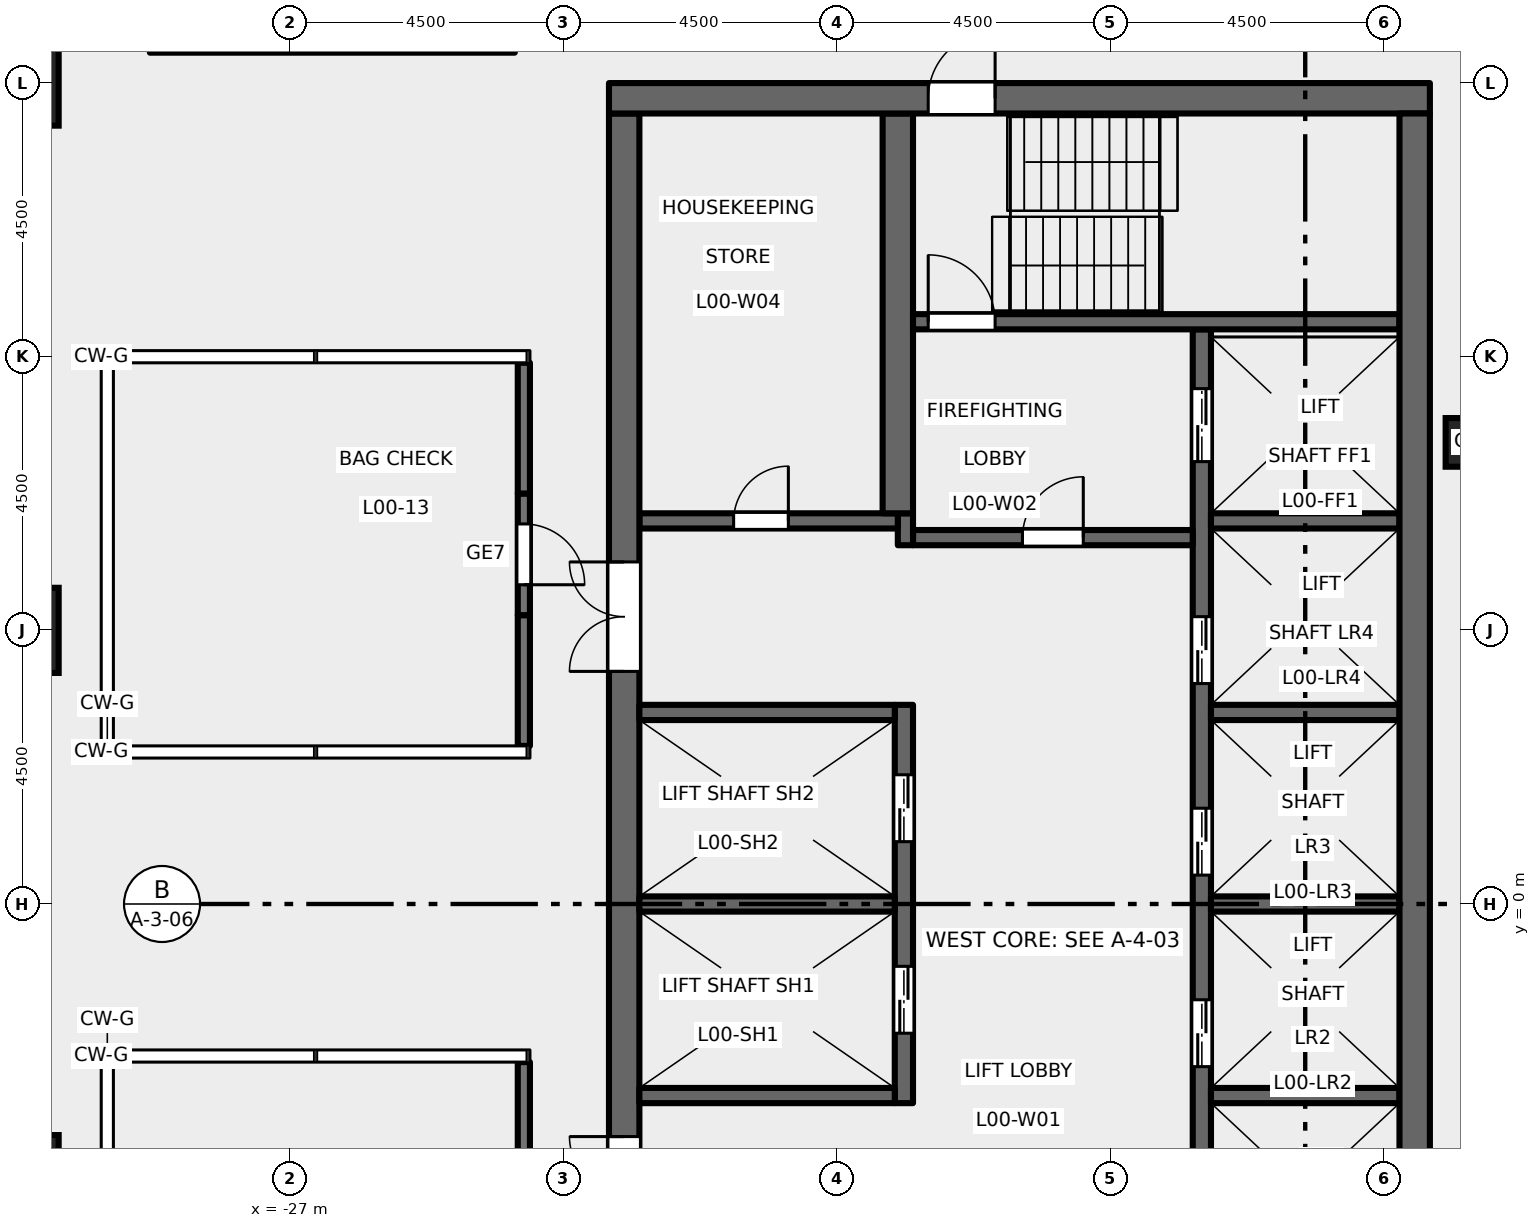
"""IFC4 building model, lengths in metres.
Left out: names, types, materials, properties, quantities, classifications, styles, units other than length and angle.
Written with IfcOpenShell. Run it as: python <this file> out.ifc"""

import sys

from ifc_helpers import new_model, si_unit, direction, frame, frame_2d, origin, origin_2d, place, context, subcontext, project, spatial, rectangle, hollow_rectangle, extrude, element, fill, save


model = new_model("IFC4")
c1 = context("Model", 3, precision=1e-05, world=origin(), true_north=direction((0.0, 1.0)))
c2 = subcontext(c1, "Body", "Model", "MODEL_VIEW")
j1 = project(units=[si_unit("LENGTHUNIT", "METRE"), si_unit("PLANEANGLEUNIT", "RADIAN")], contexts=[c1])
p1 = place(None, origin())
s1 = spatial("IfcSite", under=j1, at=p1, CompositionType="ELEMENT")
p2 = place(p1, origin())
s2 = spatial("IfcBuilding", under=s1, at=p2, CompositionType="ELEMENT")
p3 = place(p2, origin())
s3 = spatial("IfcBuildingStorey", under=s2, at=p3, CompositionType="ELEMENT", Elevation=0.0)
for number, where, z_axis, x_axis in (
    (1, (-31.5, 13.5, 0.0), (0.0, 0.0, 1.0), (1.0, 0.0, 0.0)),
    (2, (-31.5, 4.5, 0.0), (0.0, 0.0, 1.0), (1.0, 0.0, 0.0)),
    (3, (-31.5, -4.5, 0.0), (0.0, 0.0, 1.0), (1.0, 0.0, 0.0)),
):
    element("IfcColumn", number, at=place(p3, frame(where, z_axis=z_axis, x_axis=x_axis)), inside=s3, PredefinedType="COLUMN", context=c2, shape_type="SweptSolid", body=[
        extrude(hollow_rectangle(XDim=1.4, YDim=1.4, WallThickness=0.07, at=origin_2d()), origin(), (0.0, 0.0, 1.0), 7.2),
    ])
p4 = place(p3, frame((-7.591, 7.591, 0.0), z_axis=(0.0, 0.0, 1.0), x_axis=(1.0, 0.0, 0.0)))
e4 = element("IfcColumn", 4, at=p4, inside=s3, PredefinedType="COLUMN", context=c2, shape_type="SweptSolid", body=[
    extrude(hollow_rectangle(XDim=0.8, YDim=0.8, WallThickness=0.05, at=origin_2d()), origin(), (0.0, 0.0, 1.0), 7.2),
])
p5 = place(p3, frame((-12.0, -9.45, 0.0), z_axis=(0.0, 0.0, 1.0), x_axis=(0.0, 1.0, 0.0)))
e5 = element("IfcWall", 5, at=p5, inside=s3, PredefinedType="SHEAR", context=c2, shape_type="SweptSolid", body=[
    extrude(rectangle(XDim=18.9, YDim=0.3, at=frame_2d((9.45, 0.0))), origin(), (0.0, 0.0, 1.0), 7.0),
])
p6 = place(p5, frame((3.625, 0.0, 0.0)))
e6 = element("IfcOpeningElement", 6, at=p6, cuts=e5, PredefinedType="OPENING", context=c2, shape_type="SweptSolid", body=[
    extrude(rectangle(XDim=1.1, YDim=2.1, at=frame_2d((0.55, 1.05))), frame((0.0, 0.16, 0.0), z_axis=(0.0, -1.0, 0.0), x_axis=(1.0, 0.0, 0.0)), (0.0, 0.0, 1.0), 0.32),
])
p7 = place(p5, frame((6.775, 0.0, 0.0)))
e7 = element("IfcOpeningElement", 7, at=p7, cuts=e5, PredefinedType="OPENING", context=c2, shape_type="SweptSolid", body=[
    extrude(rectangle(XDim=1.1, YDim=2.1, at=frame_2d((0.55, 1.05))), frame((0.0, 0.16, 0.0), z_axis=(0.0, -1.0, 0.0), x_axis=(1.0, 0.0, 0.0)), (0.0, 0.0, 1.0), 0.32),
])
p8 = place(p5, frame((9.925, 0.0, 0.0)))
e8 = element("IfcOpeningElement", 8, at=p8, cuts=e5, PredefinedType="OPENING", context=c2, shape_type="SweptSolid", body=[
    extrude(rectangle(XDim=1.1, YDim=2.1, at=frame_2d((0.55, 1.05))), frame((0.0, 0.16, 0.0), z_axis=(0.0, -1.0, 0.0), x_axis=(1.0, 0.0, 0.0)), (0.0, 0.0, 1.0), 0.32),
])
p9 = place(p5, frame((13.075, 0.0, 0.0)))
e9 = element("IfcOpeningElement", 9, at=p9, cuts=e5, PredefinedType="OPENING", context=c2, shape_type="SweptSolid", body=[
    extrude(rectangle(XDim=1.1, YDim=2.1, at=frame_2d((0.55, 1.05))), frame((0.0, 0.16, 0.0), z_axis=(0.0, -1.0, 0.0), x_axis=(1.0, 0.0, 0.0)), (0.0, 0.0, 1.0), 0.32),
])
p10 = place(p5, frame((16.725, 0.0, 0.0)))
e10 = element("IfcOpeningElement", 10, at=p10, cuts=e5, PredefinedType="OPENING", context=c2, shape_type="SweptSolid", body=[
    extrude(rectangle(XDim=1.2, YDim=2.1, at=frame_2d((0.6, 1.05))), frame((0.0, 0.16, 0.0), z_axis=(0.0, -1.0, 0.0), x_axis=(1.0, 0.0, 0.0)), (0.0, 0.0, 1.0), 0.32),
])
p11 = place(p5, frame((0.975, 0.0, 0.0)))
e11 = element("IfcOpeningElement", 11, at=p11, cuts=e5, PredefinedType="OPENING", context=c2, shape_type="SweptSolid", body=[
    extrude(rectangle(XDim=1.2, YDim=2.1, at=frame_2d((0.6, 1.05))), frame((0.0, 0.16, 0.0), z_axis=(0.0, -1.0, 0.0), x_axis=(1.0, 0.0, 0.0)), (0.0, 0.0, 1.0), 0.32),
])
p12 = place(p3, frame((-12.15, 6.025, 0.0), z_axis=(0.0, 0.0, 1.0), x_axis=(-1.0, 0.0, 0.0)))
e12 = element("IfcWall", 12, at=p12, inside=s3, PredefinedType="SHEAR", context=c2, shape_type="SweptSolid", body=[
    extrude(rectangle(XDim=4.6, YDim=0.25, at=frame_2d((2.3, 0.0))), origin(), (0.0, 0.0, 1.0), 7.0),
])
p13 = place(p12, frame((1.8, 0.0, 0.0)))
e13 = element("IfcOpeningElement", 13, at=p13, cuts=e12, PredefinedType="OPENING", context=c2, shape_type="SweptSolid", body=[
    extrude(rectangle(XDim=1.0, YDim=2.1, at=frame_2d((0.5, 1.05))), frame((0.0, 0.135, 0.0), z_axis=(0.0, -1.0, 0.0), x_axis=(1.0, 0.0, 0.0)), (0.0, 0.0, 1.0), 0.27),
])
p14 = place(p3, frame((-16.875, 5.9, 0.0), z_axis=(0.0, 0.0, 1.0), x_axis=(0.0, 1.0, 0.0)))
e14 = element("IfcWall", 14, at=p14, inside=s3, PredefinedType="SHEAR", context=c2, shape_type="SweptSolid", body=[
    extrude(rectangle(XDim=0.525, YDim=0.25, at=frame_2d((0.263, 0.0))), origin(), (0.0, 0.0, 1.0), 7.0),
])
p15 = place(p3, frame((-17.0, 6.3, 0.0), z_axis=(0.0, 0.0, 1.0), x_axis=(-1.0, 0.0, 0.0)))
e15 = element("IfcWall", 15, at=p15, inside=s3, PredefinedType="SHEAR", context=c2, shape_type="SweptSolid", body=[
    extrude(rectangle(XDim=4.25, YDim=0.25, at=frame_2d((2.125, 0.0))), origin(), (0.0, 0.0, 1.0), 7.0),
])
p16 = place(p15, frame((1.8, 0.0, 0.0)))
e16 = element("IfcOpeningElement", 16, at=p16, cuts=e15, PredefinedType="OPENING", context=c2, shape_type="SweptSolid", body=[
    extrude(rectangle(XDim=0.9, YDim=2.1, at=frame_2d((0.45, 1.05))), frame((0.0, 0.135, 0.0), z_axis=(0.0, -1.0, 0.0), x_axis=(1.0, 0.0, 0.0)), (0.0, 0.0, 1.0), 0.27),
])
p17 = place(p3, frame((-21.5, -13.0, 0.0), z_axis=(0.0, 0.0, 1.0), x_axis=(0.0, 1.0, 0.0)))
e17 = element("IfcWall", 17, at=p17, inside=s3, PredefinedType="SHEAR", context=c2, shape_type="SweptSolid", body=[
    extrude(rectangle(XDim=26.0, YDim=0.5, at=frame_2d((13.0, 0.0))), origin(), (0.0, 0.0, 1.0), 7.0),
])
p18 = place(p17, frame((16.825, 0.0, 0.0)))
e18 = element("IfcOpeningElement", 18, at=p18, cuts=e17, PredefinedType="OPENING", context=c2, shape_type="SweptSolid", body=[
    extrude(rectangle(XDim=1.8, YDim=2.1, at=frame_2d((0.9, 1.05))), frame((0.0, 0.26, 0.0), z_axis=(0.0, -1.0, 0.0), x_axis=(1.0, 0.0, 0.0)), (0.0, 0.0, 1.0), 0.52),
])
p19 = place(p17, frame((7.375, 0.0, 0.0)))
e19 = element("IfcOpeningElement", 19, at=p19, cuts=e17, PredefinedType="OPENING", context=c2, shape_type="SweptSolid", body=[
    extrude(rectangle(XDim=1.8, YDim=2.1, at=frame_2d((0.9, 1.05))), frame((0.0, 0.26, 0.0), z_axis=(0.0, -1.0, 0.0), x_axis=(1.0, 0.0, 0.0)), (0.0, 0.0, 1.0), 0.52),
])
p20 = place(p17, frame((2.6, 0.0, 0.0)))
e20 = element("IfcOpeningElement", 20, at=p20, cuts=e17, PredefinedType="OPENING", context=c2, shape_type="SweptSolid", body=[
    extrude(rectangle(XDim=1.0, YDim=2.1, at=frame_2d((0.5, 1.05))), frame((0.0, 0.26, 0.0), z_axis=(0.0, -1.0, 0.0), x_axis=(1.0, 0.0, 0.0)), (0.0, 0.0, 1.0), 0.52),
])
p21 = place(p3, frame((-16.9, -3.275, 0.0), z_axis=(0.0, 0.0, 1.0), x_axis=(0.0, 1.0, 0.0)))
e21 = element("IfcWall", 21, at=p21, inside=s3, PredefinedType="SHEAR", context=c2, shape_type="SweptSolid", body=[
    extrude(rectangle(XDim=6.55, YDim=0.3, at=frame_2d((3.275, 0.0))), origin(), (0.0, 0.0, 1.0), 7.0),
])
p22 = place(p21, frame((1.15, 0.0, 0.0)))
e22 = element("IfcOpeningElement", 22, at=p22, cuts=e21, PredefinedType="OPENING", context=c2, shape_type="SweptSolid", body=[
    extrude(rectangle(XDim=1.1, YDim=2.1, at=frame_2d((0.55, 1.05))), frame((0.0, 0.16, 0.0), z_axis=(0.0, -1.0, 0.0), x_axis=(1.0, 0.0, 0.0)), (0.0, 0.0, 1.0), 0.32),
])
p23 = place(p21, frame((4.3, 0.0, 0.0)))
e23 = element("IfcOpeningElement", 23, at=p23, cuts=e21, PredefinedType="OPENING", context=c2, shape_type="SweptSolid", body=[
    extrude(rectangle(XDim=1.1, YDim=2.1, at=frame_2d((0.55, 1.05))), frame((0.0, 0.16, 0.0), z_axis=(0.0, -1.0, 0.0), x_axis=(1.0, 0.0, 0.0)), (0.0, 0.0, 1.0), 0.32),
])
for number, where, z_axis, x_axis in (
    (24, (-17.05, 0.0, 0.0), (0.0, 0.0, 1.0), (-1.0, 0.0, 0.0)),
    (25, (-17.05, 3.15, 0.0), (0.0, 0.0, 1.0), (-1.0, 0.0, 0.0)),
    (26, (-17.05, -3.15, 0.0), (0.0, 0.0, 1.0), (-1.0, 0.0, 0.0)),
):
    element("IfcWall", number, at=place(p3, frame(where, z_axis=z_axis, x_axis=x_axis)), inside=s3, PredefinedType="SHEAR", context=c2, shape_type="SweptSolid", body=[
        extrude(rectangle(XDim=4.2, YDim=0.25, at=frame_2d((2.1, 0.0))), origin(), (0.0, 0.0, 1.0), 7.0),
    ])
p24 = place(p3, frame((-17.0, 6.425, 0.0), z_axis=(0.0, 0.0, 1.0), x_axis=(0.0, 1.0, 0.0)))
e27 = element("IfcWall", 27, at=p24, inside=s3, PredefinedType="SHEAR", context=c2, shape_type="SweptSolid", body=[
    extrude(rectangle(XDim=6.575, YDim=0.5, at=frame_2d((3.288, 0.0))), origin(), (0.0, 0.0, 1.0), 7.0),
])
for number, where, z_axis, x_axis in (
    (28, (-8.75, 0.0, 0.0), (0.0, 0.0, 1.0), (-1.0, 0.0, 0.0)),
    (29, (-8.75, 3.15, 0.0), (0.0, 0.0, 1.0), (-1.0, 0.0, 0.0)),
    (30, (-8.75, 6.3, 0.0), (0.0, 0.0, 1.0), (-1.0, 0.0, 0.0)),
    (31, (-8.75, -3.15, 0.0), (0.0, 0.0, 1.0), (-1.0, 0.0, 0.0)),
):
    element("IfcWall", number, at=place(p3, frame(where, z_axis=z_axis, x_axis=x_axis)), inside=s3, PredefinedType="SHEAR", context=c2, shape_type="SweptSolid", body=[
        extrude(rectangle(XDim=3.1, YDim=0.25, at=frame_2d((1.55, 0.0))), origin(), (0.0, 0.0, 1.0), 7.0),
    ])
p25 = place(p3, frame((-8.75, 9.575, 0.0), z_axis=(0.0, 0.0, 1.0), x_axis=(-1.0, 0.0, 0.0)))
e32 = element("IfcWall", 32, at=p25, inside=s3, PredefinedType="SHEAR", context=c2, shape_type="SweptSolid", body=[
    extrude(rectangle(XDim=8.0, YDim=0.25, at=frame_2d((4.0, 0.0))), origin(), (0.0, 0.0, 1.0), 7.0),
])
p26 = place(p25, frame((6.65, 0.0, 0.0)))
e33 = element("IfcOpeningElement", 33, at=p26, cuts=e32, PredefinedType="OPENING", context=c2, shape_type="SweptSolid", body=[
    extrude(rectangle(XDim=1.1, YDim=2.1, at=frame_2d((0.55, 1.05))), frame((0.0, 0.135, 0.0), z_axis=(0.0, -1.0, 0.0), x_axis=(1.0, 0.0, 0.0)), (0.0, 0.0, 1.0), 0.27),
])
p27 = place(p3, frame((-8.25, 13.25, 0.0), z_axis=(0.0, 0.0, 1.0), x_axis=(-1.0, 0.0, 0.0)))
e34 = element("IfcWall", 34, at=p27, inside=s3, PredefinedType="SHEAR", context=c2, shape_type="SweptSolid", body=[
    extrude(rectangle(XDim=13.5, YDim=0.5, at=frame_2d((6.75, 0.0))), origin(), (0.0, 0.0, 1.0), 7.0),
])
p28 = place(p27, frame((7.15, 0.0, 0.0)))
e35 = element("IfcOpeningElement", 35, at=p28, cuts=e34, PredefinedType="OPENING", context=c2, shape_type="SweptSolid", body=[
    extrude(rectangle(XDim=1.1, YDim=2.1, at=frame_2d((0.55, 1.05))), frame((0.0, 0.26, 0.0), z_axis=(0.0, -1.0, 0.0), x_axis=(1.0, 0.0, 0.0)), (0.0, 0.0, 1.0), 0.52),
])
p29 = place(p3, frame((-8.5, -13.0, 0.0), z_axis=(0.0, 0.0, 1.0), x_axis=(0.0, 1.0, 0.0)))
e36 = element("IfcWall", 36, at=p29, inside=s3, PredefinedType="SHEAR", context=c2, shape_type="SweptSolid", body=[
    extrude(rectangle(XDim=26.0, YDim=0.5, at=frame_2d((13.0, 0.0))), origin(), (0.0, 0.0, 1.0), 7.0),
])
p30 = place(p3, frame((-23.15, -4.35, 0.0), z_axis=(0.0, 0.0, 1.0), x_axis=(0.0, 1.0, 0.0)))
e37 = element("IfcWall", 37, at=p30, inside=s3, PredefinedType="SOLIDWALL", context=c2, shape_type="SweptSolid", body=[
    extrude(rectangle(XDim=1.75, YDim=0.2, at=frame_2d((0.875, 0.0))), origin(), (0.0, 0.0, 1.0), 4.3),
])
p31 = place(p3, frame((-23.15, 2.6, 0.0), z_axis=(0.0, 0.0, 1.0), x_axis=(0.0, 1.0, 0.0)))
e38 = element("IfcWall", 38, at=p31, inside=s3, PredefinedType="SOLIDWALL", context=c2, shape_type="SweptSolid", body=[
    extrude(rectangle(XDim=2.15, YDim=0.2, at=frame_2d((1.075, 0.0))), origin(), (0.0, 0.0, 1.0), 4.3),
])
p32 = place(p3, frame((-23.15, 4.75, 0.0), z_axis=(0.0, 0.0, 1.0), x_axis=(0.0, 1.0, 0.0)))
e39 = element("IfcWall", 39, at=p32, inside=s3, PredefinedType="SOLIDWALL", context=c2, shape_type="SweptSolid", body=[
    extrude(rectangle(XDim=2.0, YDim=0.2, at=frame_2d((1.0, 0.0))), origin(), (0.0, 0.0, 1.0), 4.3),
])
p33 = place(p32, frame((0.5, 0.0, 0.0)))
e40 = element("IfcOpeningElement", 40, at=p33, cuts=e39, PredefinedType="OPENING", context=c2, shape_type="SweptSolid", body=[
    extrude(rectangle(XDim=1.0, YDim=2.1, at=frame_2d((0.5, 1.05))), frame((0.0, 0.11, 0.0), z_axis=(0.0, -1.0, 0.0), x_axis=(1.0, 0.0, 0.0)), (0.0, 0.0, 1.0), 0.22),
])
p34 = place(p3, frame((-23.15, 6.75, 0.0), z_axis=(0.0, 0.0, 1.0), x_axis=(0.0, 1.0, 0.0)))
e41 = element("IfcWall", 41, at=p34, inside=s3, PredefinedType="SOLIDWALL", context=c2, shape_type="SweptSolid", body=[
    extrude(rectangle(XDim=2.15, YDim=0.2, at=frame_2d((1.075, 0.0))), origin(), (0.0, 0.0, 1.0), 4.3),
])
p35 = place(p3, frame((-29.3, 14.15, 0.0), z_axis=(0.0, 0.0, 1.0), x_axis=(1.0, 0.0, 0.0)))
e42 = element("IfcWall", 42, at=p35, inside=s3, PredefinedType="SHEAR", context=c2, shape_type="SweptSolid", body=[
    extrude(rectangle(XDim=6.0, YDim=0.3, at=frame_2d((3.0, 0.0))), origin(), (0.0, 0.0, 1.0), 7.0),
])
p36 = place(p13, origin())
e43 = element("IfcDoor", 43, at=p36, inside=s3, OperationType="SINGLE_SWING_LEFT", PredefinedType="DOOR", context=c2, shape_type="SweptSolid", body=[
    extrude(rectangle(XDim=1.0, YDim=2.1, at=frame_2d((0.5, 1.05))), frame((0.0, 0.025, 0.0), z_axis=(0.0, -1.0, 0.0), x_axis=(1.0, 0.0, 0.0)), (0.0, 0.0, 1.0), 0.05),
])
fill(e13, e43)
p37 = place(p26, origin())
e44 = element("IfcDoor", 44, at=p37, inside=s3, OperationType="SINGLE_SWING_RIGHT", PredefinedType="DOOR", context=c2, shape_type="SweptSolid", body=[
    extrude(rectangle(XDim=1.1, YDim=2.1, at=frame_2d((0.55, 1.05))), frame((0.0, 0.025, 0.0), z_axis=(0.0, -1.0, 0.0), x_axis=(1.0, 0.0, 0.0)), (0.0, 0.0, 1.0), 0.05),
])
fill(e33, e44)
p38 = place(p18, origin())
e45 = element("IfcDoor", 45, at=p38, inside=s3, OperationType="DOUBLE_DOOR_DOUBLE_SWING", PredefinedType="DOOR", context=c2, shape_type="SweptSolid", body=[
    extrude(rectangle(XDim=1.8, YDim=2.1, at=frame_2d((0.9, 1.05))), frame((0.0, 0.025, 0.0), z_axis=(0.0, -1.0, 0.0), x_axis=(1.0, 0.0, 0.0)), (0.0, 0.0, 1.0), 0.05),
])
fill(e18, e45)
p39 = place(p19, origin())
e46 = element("IfcDoor", 46, at=p39, inside=s3, OperationType="DOUBLE_DOOR_DOUBLE_SWING", PredefinedType="DOOR", context=c2, shape_type="SweptSolid", body=[
    extrude(rectangle(XDim=1.8, YDim=2.1, at=frame_2d((0.9, 1.05))), frame((0.0, 0.025, 0.0), z_axis=(0.0, -1.0, 0.0), x_axis=(1.0, 0.0, 0.0)), (0.0, 0.0, 1.0), 0.05),
])
fill(e19, e46)
p40 = place(p28, frame((1.1, 0.0, 0.0), z_axis=(0.0, 0.0, 1.0), x_axis=(-1.0, 0.0, 0.0)))
e47 = element("IfcDoor", 47, at=p40, inside=s3, OperationType="SINGLE_SWING_LEFT", PredefinedType="DOOR", context=c2, shape_type="SweptSolid", body=[
    extrude(rectangle(XDim=1.1, YDim=2.1, at=frame_2d((0.55, 1.05))), frame((0.0, 0.025, 0.0), z_axis=(0.0, -1.0, 0.0), x_axis=(1.0, 0.0, 0.0)), (0.0, 0.0, 1.0), 0.05),
])
fill(e35, e47)
p41 = place(p7, origin())
e48 = element("IfcDoor", 48, at=p41, inside=s3, OperationType="DOUBLE_DOOR_SLIDING", PredefinedType="DOOR", context=c2, shape_type="SweptSolid", body=[
    extrude(rectangle(XDim=1.1, YDim=2.1, at=frame_2d((0.55, 1.05))), frame((0.0, 0.025, 0.0), z_axis=(0.0, -1.0, 0.0), x_axis=(1.0, 0.0, 0.0)), (0.0, 0.0, 1.0), 0.05),
])
fill(e7, e48)
p42 = place(p8, origin())
e49 = element("IfcDoor", 49, at=p42, inside=s3, OperationType="DOUBLE_DOOR_SLIDING", PredefinedType="DOOR", context=c2, shape_type="SweptSolid", body=[
    extrude(rectangle(XDim=1.1, YDim=2.1, at=frame_2d((0.55, 1.05))), frame((0.0, 0.025, 0.0), z_axis=(0.0, -1.0, 0.0), x_axis=(1.0, 0.0, 0.0)), (0.0, 0.0, 1.0), 0.05),
])
fill(e8, e49)
p43 = place(p9, origin())
e50 = element("IfcDoor", 50, at=p43, inside=s3, OperationType="DOUBLE_DOOR_SLIDING", PredefinedType="DOOR", context=c2, shape_type="SweptSolid", body=[
    extrude(rectangle(XDim=1.1, YDim=2.1, at=frame_2d((0.55, 1.05))), frame((0.0, 0.025, 0.0), z_axis=(0.0, -1.0, 0.0), x_axis=(1.0, 0.0, 0.0)), (0.0, 0.0, 1.0), 0.05),
])
fill(e9, e50)
p44 = place(p22, origin())
e51 = element("IfcDoor", 51, at=p44, inside=s3, OperationType="DOUBLE_DOOR_SLIDING", PredefinedType="DOOR", context=c2, shape_type="SweptSolid", body=[
    extrude(rectangle(XDim=1.1, YDim=2.1, at=frame_2d((0.55, 1.05))), frame((0.0, 0.025, 0.0), z_axis=(0.0, -1.0, 0.0), x_axis=(1.0, 0.0, 0.0)), (0.0, 0.0, 1.0), 0.05),
])
fill(e22, e51)
p45 = place(p23, origin())
e52 = element("IfcDoor", 52, at=p45, inside=s3, OperationType="DOUBLE_DOOR_SLIDING", PredefinedType="DOOR", context=c2, shape_type="SweptSolid", body=[
    extrude(rectangle(XDim=1.1, YDim=2.1, at=frame_2d((0.55, 1.05))), frame((0.0, 0.025, 0.0), z_axis=(0.0, -1.0, 0.0), x_axis=(1.0, 0.0, 0.0)), (0.0, 0.0, 1.0), 0.05),
])
fill(e23, e52)
p46 = place(p10, origin())
e53 = element("IfcDoor", 53, at=p46, inside=s3, OperationType="DOUBLE_DOOR_SLIDING", PredefinedType="DOOR", context=c2, shape_type="SweptSolid", body=[
    extrude(rectangle(XDim=1.2, YDim=2.1, at=frame_2d((0.6, 1.05))), frame((0.0, 0.025, 0.0), z_axis=(0.0, -1.0, 0.0), x_axis=(1.0, 0.0, 0.0)), (0.0, 0.0, 1.0), 0.05),
])
fill(e10, e53)
p47 = place(p16, origin())
e54 = element("IfcDoor", 54, at=p47, inside=s3, OperationType="SINGLE_SWING_LEFT", PredefinedType="DOOR", context=c2, shape_type="SweptSolid", body=[
    extrude(rectangle(XDim=0.9, YDim=2.1, at=frame_2d((0.45, 1.05))), frame((0.0, 0.025, 0.0), z_axis=(0.0, -1.0, 0.0), x_axis=(1.0, 0.0, 0.0)), (0.0, 0.0, 1.0), 0.05),
])
fill(e16, e54)
p48 = place(p33, frame((1.0, 0.0, 0.0), z_axis=(0.0, 0.0, 1.0), x_axis=(-1.0, 0.0, 0.0)))
e55 = element("IfcDoor", 55, at=p48, inside=s3, OperationType="SINGLE_SWING_LEFT", PredefinedType="DOOR", context=c2, shape_type="SweptSolid", body=[
    extrude(rectangle(XDim=1.0, YDim=2.1, at=frame_2d((0.5, 1.05))), frame((0.0, 0.025, 0.0), z_axis=(0.0, -1.0, 0.0), x_axis=(1.0, 0.0, 0.0)), (0.0, 0.0, 1.0), 0.05),
])
fill(e40, e55)
save(model, sys.argv[1])
